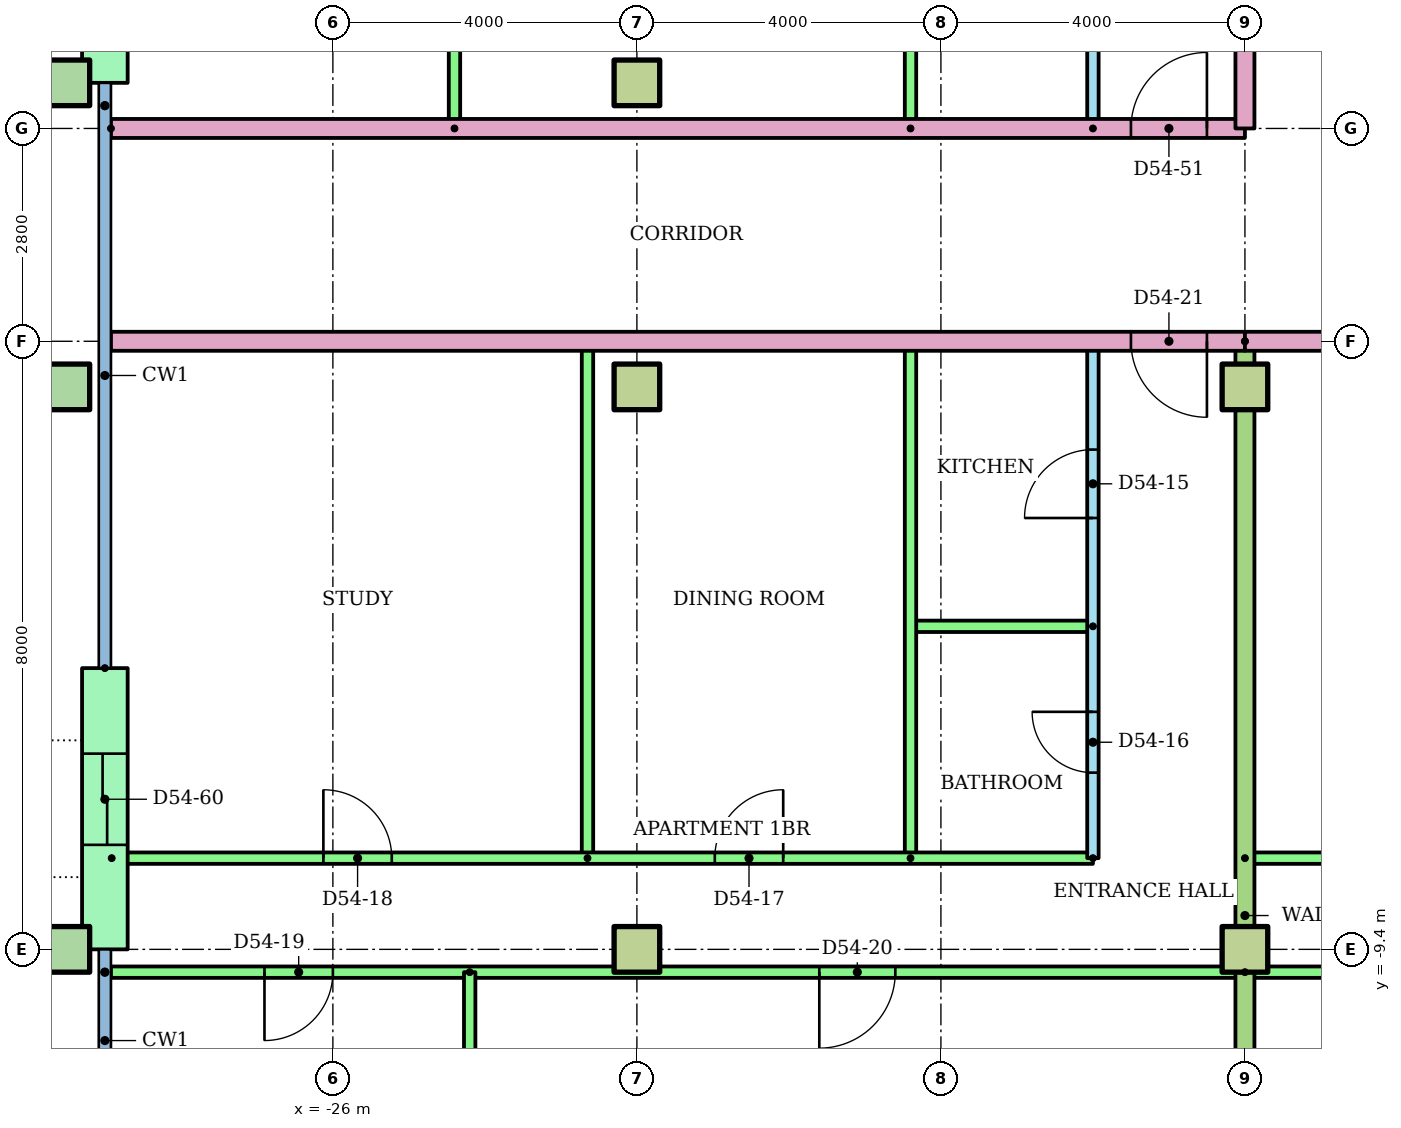
"""IFC4 building model, lengths in metres.
Left out: names, types, materials, properties, quantities, classifications, styles, units other than length and angle.
Written with IfcOpenShell. Run it as: python <this file> out.ifc"""

import sys

from ifc_helpers import new_model, si_unit, direction, frame, frame_2d, origin, origin_2d, place, context, subcontext, project, spatial, rectangle, hollow_rectangle, extrude, element, fill, save


model = new_model("IFC4")
c1 = context("Model", 3, precision=1e-05, world=origin(), true_north=direction((0.0, 1.0)))
c2 = subcontext(c1, "Body", "Model", "MODEL_VIEW")
j1 = project(units=[si_unit("LENGTHUNIT", "METRE"), si_unit("PLANEANGLEUNIT", "RADIAN")], contexts=[c1])
p1 = place(None, origin())
s1 = spatial("IfcSite", under=j1, at=p1, CompositionType="ELEMENT")
p2 = place(p1, origin())
s2 = spatial("IfcBuilding", under=s1, at=p2, CompositionType="ELEMENT")
p3 = place(p2, frame((0.0, 0.0, 210.8)))
s3 = spatial("IfcBuildingStorey", under=s2, at=p3, CompositionType="ELEMENT", Elevation=210.8)
p4 = place(p3, frame((-29.5, -9.4, 0.0)))
e1 = element("IfcColumn", 1, at=p4, inside=s3, PredefinedType="COLUMN", context=c2, shape_type="SweptSolid", body=[
    extrude(hollow_rectangle(XDim=0.6, YDim=0.6, WallThickness=0.03, at=origin_2d()), origin(), (0.0, 0.0, 1.0), 3.2),
])
for number, where in (
    (2, (-22.0, -9.4, 0.0)),
    (3, (-14.0, -9.4, 0.0)),
):
    element("IfcColumn", number, at=place(p3, frame(where)), inside=s3, PredefinedType="COLUMN", context=c2, shape_type="SweptSolid", body=[
        extrude(rectangle(XDim=0.6, YDim=0.6, at=origin_2d()), origin(), (0.0, 0.0, 1.0), 3.2),
    ])
p5 = place(p3, frame((-29.5, -2.0, 0.0)))
e4 = element("IfcColumn", 4, at=p5, inside=s3, PredefinedType="COLUMN", context=c2, shape_type="SweptSolid", body=[
    extrude(hollow_rectangle(XDim=0.6, YDim=0.6, WallThickness=0.03, at=origin_2d()), origin(), (0.0, 0.0, 1.0), 3.2),
])
for number, where in (
    (5, (-22.0, -2.0, 0.0)),
    (6, (-14.0, -2.0, 0.0)),
):
    element("IfcColumn", number, at=place(p3, frame(where)), inside=s3, PredefinedType="COLUMN", context=c2, shape_type="SweptSolid", body=[
        extrude(rectangle(XDim=0.6, YDim=0.6, at=origin_2d()), origin(), (0.0, 0.0, 1.0), 3.2),
    ])
p6 = place(p3, frame((-29.5, 2.0, 0.0)))
e7 = element("IfcColumn", 7, at=p6, inside=s3, PredefinedType="COLUMN", context=c2, shape_type="SweptSolid", body=[
    extrude(hollow_rectangle(XDim=0.6, YDim=0.6, WallThickness=0.03, at=origin_2d()), origin(), (0.0, 0.0, 1.0), 3.2),
])
p7 = place(p3, frame((-22.0, 2.0, 0.0)))
e8 = element("IfcColumn", 8, at=p7, inside=s3, PredefinedType="COLUMN", context=c2, shape_type="SweptSolid", body=[
    extrude(rectangle(XDim=0.6, YDim=0.6, at=origin_2d()), origin(), (0.0, 0.0, 1.0), 3.2),
])
p8 = place(p3, frame((-29.0, 6.5, 0.0), z_axis=(0.0, 0.0, 1.0), x_axis=(0.0, -1.0, 0.0)))
e9 = element("IfcWall", 9, at=p8, inside=s3, PredefinedType="STANDARD", context=c2, shape_type="SweptSolid", body=[
    extrude(rectangle(XDim=4.5, YDim=0.6, at=frame_2d((2.25, 0.0))), origin(), (0.0, 0.0, 1.0), 2.92),
])
p9 = place(p8, frame((1.65, 0.0, 0.0)))
e10 = element("IfcOpeningElement", 10, at=p9, cuts=e9, PredefinedType="OPENING", context=c2, shape_type="SweptSolid", body=[
    extrude(rectangle(XDim=1.2, YDim=2.1, at=frame_2d((0.6, 1.05))), frame((0.0, 0.31, 0.0), z_axis=(0.0, -1.0, 0.0), x_axis=(1.0, 0.0, 0.0)), (0.0, 0.0, 1.0), 0.62),
])
p10 = place(p3, frame((-29.0, -5.7, 0.0), z_axis=(0.0, 0.0, 1.0), x_axis=(0.0, -1.0, 0.0)))
e11 = element("IfcWall", 11, at=p10, inside=s3, PredefinedType="STANDARD", context=c2, shape_type="SweptSolid", body=[
    extrude(rectangle(XDim=3.7, YDim=0.6, at=frame_2d((1.85, 0.0))), origin(), (0.0, 0.0, 1.0), 2.92),
])
p11 = place(p10, frame((1.125, 0.0, 0.0)))
e12 = element("IfcOpeningElement", 12, at=p11, cuts=e11, PredefinedType="OPENING", context=c2, shape_type="SweptSolid", body=[
    extrude(rectangle(XDim=1.2, YDim=2.1, at=frame_2d((0.6, 1.05))), frame((0.0, 0.31, 0.0), z_axis=(0.0, -1.0, 0.0), x_axis=(1.0, 0.0, 0.0)), (0.0, 0.0, 1.0), 0.62),
])
p12 = place(p3, frame((-16.0, -8.2, 0.0), z_axis=(0.0, 0.0, 1.0), x_axis=(0.0, 1.0, 0.0)))
e13 = element("IfcWall", 13, at=p12, inside=s3, PredefinedType="PARTITIONING", context=c2, shape_type="SweptSolid", body=[
    extrude(rectangle(XDim=6.8, YDim=0.15, at=frame_2d((3.4, 0.0))), origin(), (0.0, 0.0, 1.0), 2.4),
])
p13 = place(p12, frame((4.475, 0.0, 0.0)))
e14 = element("IfcOpeningElement", 14, at=p13, cuts=e13, PredefinedType="OPENING", context=c2, shape_type="SweptSolid", body=[
    extrude(rectangle(XDim=0.9, YDim=2.1, at=frame_2d((0.45, 1.05))), frame((0.0, 0.085, 0.0), z_axis=(0.0, -1.0, 0.0), x_axis=(1.0, 0.0, 0.0)), (0.0, 0.0, 1.0), 0.17),
])
p14 = place(p12, frame((1.125, 0.0, 0.0)))
e15 = element("IfcOpeningElement", 15, at=p14, cuts=e13, PredefinedType="OPENING", context=c2, shape_type="SweptSolid", body=[
    extrude(rectangle(XDim=0.8, YDim=2.1, at=frame_2d((0.4, 1.05))), frame((0.0, 0.085, 0.0), z_axis=(0.0, -1.0, 0.0), x_axis=(1.0, 0.0, 0.0)), (0.0, 0.0, 1.0), 0.17),
])
p15 = place(p3, frame((-16.0, -5.15, 0.0), z_axis=(0.0, 0.0, 1.0), x_axis=(-1.0, 0.0, 0.0)))
e16 = element("IfcWall", 16, at=p15, inside=s3, PredefinedType="PARTITIONING", context=c2, shape_type="SweptSolid", body=[
    extrude(rectangle(XDim=2.4, YDim=0.15, at=frame_2d((1.2, 0.0))), origin(), (0.0, 0.0, 1.0), 2.4),
])
for number, where, z_axis, x_axis in (
    (17, (-18.4, -8.2, 0.0), (0.0, 0.0, 1.0), (0.0, 1.0, 0.0)),
    (18, (-22.65, -8.2, 0.0), (0.0, 0.0, 1.0), (0.0, 1.0, 0.0)),
):
    element("IfcWall", number, at=place(p3, frame(where, z_axis=z_axis, x_axis=x_axis)), inside=s3, PredefinedType="PARTITIONING", context=c2, shape_type="SweptSolid", body=[
        extrude(rectangle(XDim=6.8, YDim=0.15, at=frame_2d((3.4, 0.0))), origin(), (0.0, 0.0, 1.0), 2.4),
    ])
p16 = place(p3, frame((-28.91, -8.2, 0.0)))
e19 = element("IfcWall", 19, at=p16, inside=s3, PredefinedType="PARTITIONING", context=c2, shape_type="SweptSolid", body=[
    extrude(rectangle(XDim=12.91, YDim=0.15, at=frame_2d((6.455, 0.0))), origin(), (0.0, 0.0, 1.0), 2.4),
])
p17 = place(p16, frame((7.935, 0.0, 0.0)))
e20 = element("IfcOpeningElement", 20, at=p17, cuts=e19, PredefinedType="OPENING", context=c2, shape_type="SweptSolid", body=[
    extrude(rectangle(XDim=0.9, YDim=2.1, at=frame_2d((0.45, 1.05))), frame((0.0, 0.085, 0.0), z_axis=(0.0, -1.0, 0.0), x_axis=(1.0, 0.0, 0.0)), (0.0, 0.0, 1.0), 0.17),
])
p18 = place(p16, frame((2.785, 0.0, 0.0)))
e21 = element("IfcOpeningElement", 21, at=p18, cuts=e19, PredefinedType="OPENING", context=c2, shape_type="SweptSolid", body=[
    extrude(rectangle(XDim=0.9, YDim=2.1, at=frame_2d((0.45, 1.05))), frame((0.0, 0.085, 0.0), z_axis=(0.0, -1.0, 0.0), x_axis=(1.0, 0.0, 0.0)), (0.0, 0.0, 1.0), 0.17),
])
p19 = place(p3, frame((-14.0, -9.7, 0.0), z_axis=(0.0, 0.0, 1.0), x_axis=(-1.0, 0.0, 0.0)))
e22 = element("IfcWall", 22, at=p19, inside=s3, PredefinedType="PARTITIONING", context=c2, shape_type="SweptSolid", body=[
    extrude(rectangle(XDim=14.92, YDim=0.15, at=frame_2d((7.46, 0.0))), origin(), (0.0, 0.0, 1.0), 2.4),
])
p20 = place(p19, frame((12.0, 0.0, 0.0)))
e23 = element("IfcOpeningElement", 23, at=p20, cuts=e22, PredefinedType="OPENING", context=c2, shape_type="SweptSolid", body=[
    extrude(rectangle(XDim=0.9, YDim=2.1, at=frame_2d((0.45, 1.05))), frame((0.0, 0.085, 0.0), z_axis=(0.0, -1.0, 0.0), x_axis=(1.0, 0.0, 0.0)), (0.0, 0.0, 1.0), 0.17),
])
p21 = place(p19, frame((4.6, 0.0, 0.0)))
e24 = element("IfcOpeningElement", 24, at=p21, cuts=e22, PredefinedType="OPENING", context=c2, shape_type="SweptSolid", body=[
    extrude(rectangle(XDim=1.0, YDim=2.1, at=frame_2d((0.5, 1.05))), frame((0.0, 0.085, 0.0), z_axis=(0.0, -1.0, 0.0), x_axis=(1.0, 0.0, 0.0)), (0.0, 0.0, 1.0), 0.17),
])
p22 = place(p3, frame((-24.2, -9.7, 0.0), z_axis=(0.0, 0.0, 1.0), x_axis=(0.0, -1.0, 0.0)))
e25 = element("IfcWall", 25, at=p22, inside=s3, PredefinedType="PARTITIONING", context=c2, shape_type="SweptSolid", body=[
    extrude(rectangle(XDim=5.02, YDim=0.15, at=frame_2d((2.51, 0.0))), origin(), (0.0, 0.0, 1.0), 2.4),
])
p23 = place(p3, frame((-14.0, -8.2, 0.0)))
e26 = element("IfcWall", 26, at=p23, inside=s3, PredefinedType="PARTITIONING", context=c2, shape_type="SweptSolid", body=[
    extrude(rectangle(XDim=22.0, YDim=0.15, at=frame_2d((11.0, 0.0))), origin(), (0.0, 0.0, 1.0), 2.4),
])
p24 = place(p23, frame((14.624, 0.0, 0.0)))
e27 = element("IfcOpeningElement", 27, at=p24, cuts=e26, PredefinedType="OPENING", context=c2, shape_type="SweptSolid", body=[
    extrude(rectangle(XDim=0.9, YDim=2.1, at=frame_2d((0.45, 1.05))), frame((0.0, 0.085, 0.0), z_axis=(0.0, -1.0, 0.0), x_axis=(1.0, 0.0, 0.0)), (0.0, 0.0, 1.0), 0.17),
])
p25 = place(p23, frame((8.476, 0.0, 0.0)))
e28 = element("IfcOpeningElement", 28, at=p25, cuts=e26, PredefinedType="OPENING", context=c2, shape_type="SweptSolid", body=[
    extrude(rectangle(XDim=0.9, YDim=2.1, at=frame_2d((0.45, 1.05))), frame((0.0, 0.085, 0.0), z_axis=(0.0, -1.0, 0.0), x_axis=(1.0, 0.0, 0.0)), (0.0, 0.0, 1.0), 0.17),
])
p26 = place(p23, frame((1.975, 0.0, 0.0)))
e29 = element("IfcOpeningElement", 29, at=p26, cuts=e26, PredefinedType="OPENING", context=c2, shape_type="SweptSolid", body=[
    extrude(rectangle(XDim=0.9, YDim=2.1, at=frame_2d((0.45, 1.05))), frame((0.0, 0.085, 0.0), z_axis=(0.0, -1.0, 0.0), x_axis=(1.0, 0.0, 0.0)), (0.0, 0.0, 1.0), 0.17),
])
p27 = place(p3, frame((10.0, -9.7, 0.0), z_axis=(0.0, 0.0, 1.0), x_axis=(-1.0, 0.0, 0.0)))
e30 = element("IfcWall", 30, at=p27, inside=s3, PredefinedType="PARTITIONING", context=c2, shape_type="SweptSolid", body=[
    extrude(rectangle(XDim=24.0, YDim=0.15, at=frame_2d((12.0, 0.0))), origin(), (0.0, 0.0, 1.0), 2.4),
])
p28 = place(p27, frame((21.55, 0.0, 0.0)))
e31 = element("IfcOpeningElement", 31, at=p28, cuts=e30, PredefinedType="OPENING", context=c2, shape_type="SweptSolid", body=[
    extrude(rectangle(XDim=0.9, YDim=2.1, at=frame_2d((0.45, 1.05))), frame((0.0, 0.085, 0.0), z_axis=(0.0, -1.0, 0.0), x_axis=(1.0, 0.0, 0.0)), (0.0, 0.0, 1.0), 0.17),
])
p29 = place(p27, frame((17.55, 0.0, 0.0)))
e32 = element("IfcOpeningElement", 32, at=p29, cuts=e30, PredefinedType="OPENING", context=c2, shape_type="SweptSolid", body=[
    extrude(rectangle(XDim=0.9, YDim=2.1, at=frame_2d((0.45, 1.05))), frame((0.0, 0.085, 0.0), z_axis=(0.0, -1.0, 0.0), x_axis=(1.0, 0.0, 0.0)), (0.0, 0.0, 1.0), 0.17),
])
p30 = place(p27, frame((11.5, 0.0, 0.0)))
e33 = element("IfcOpeningElement", 33, at=p30, cuts=e30, PredefinedType="OPENING", context=c2, shape_type="SweptSolid", body=[
    extrude(rectangle(XDim=1.0, YDim=2.1, at=frame_2d((0.5, 1.05))), frame((0.0, 0.085, 0.0), z_axis=(0.0, -1.0, 0.0), x_axis=(1.0, 0.0, 0.0)), (0.0, 0.0, 1.0), 0.17),
])
p31 = place(p27, frame((5.55, 0.0, 0.0)))
e34 = element("IfcOpeningElement", 34, at=p31, cuts=e30, PredefinedType="OPENING", context=c2, shape_type="SweptSolid", body=[
    extrude(rectangle(XDim=0.9, YDim=2.1, at=frame_2d((0.45, 1.05))), frame((0.0, 0.085, 0.0), z_axis=(0.0, -1.0, 0.0), x_axis=(1.0, 0.0, 0.0)), (0.0, 0.0, 1.0), 0.17),
])
p32 = place(p27, frame((1.55, 0.0, 0.0)))
e35 = element("IfcOpeningElement", 35, at=p32, cuts=e30, PredefinedType="OPENING", context=c2, shape_type="SweptSolid", body=[
    extrude(rectangle(XDim=0.9, YDim=2.1, at=frame_2d((0.45, 1.05))), frame((0.0, 0.085, 0.0), z_axis=(0.0, -1.0, 0.0), x_axis=(1.0, 0.0, 0.0)), (0.0, 0.0, 1.0), 0.17),
])
p33 = place(p3, frame((-14.0, -1.4, 0.0), z_axis=(0.0, 0.0, 1.0), x_axis=(0.0, -1.0, 0.0)))
e36 = element("IfcWall", 36, at=p33, inside=s3, PredefinedType="PARTITIONING", context=c2, shape_type="SweptSolid", body=[
    extrude(rectangle(XDim=15.11, YDim=0.25, at=frame_2d((7.555, 0.0))), origin(), (0.0, 0.0, 1.0), 2.4),
])
p34 = place(p3, frame((-14.0, -1.4, 0.0), z_axis=(0.0, 0.0, 1.0), x_axis=(-1.0, 0.0, 0.0)))
e37 = element("IfcWall", 37, at=p34, inside=s3, PredefinedType="PARTITIONING", context=c2, shape_type="SweptSolid", body=[
    extrude(rectangle(XDim=14.92, YDim=0.25, at=frame_2d((7.46, 0.0))), origin(), (0.0, 0.0, 1.0), 2.4),
])
p35 = place(p34, frame((0.5, 0.0, 0.0)))
e38 = element("IfcOpeningElement", 38, at=p35, cuts=e37, PredefinedType="OPENING", context=c2, shape_type="SweptSolid", body=[
    extrude(rectangle(XDim=1.0, YDim=2.1, at=frame_2d((0.5, 1.05))), frame((0.0, 0.135, 0.0), z_axis=(0.0, -1.0, 0.0), x_axis=(1.0, 0.0, 0.0)), (0.0, 0.0, 1.0), 0.27),
])
p36 = place(p3, frame((-16.0, 1.4, 0.0), z_axis=(0.0, 0.0, 1.0), x_axis=(0.0, 1.0, 0.0)))
e39 = element("IfcWall", 39, at=p36, inside=s3, PredefinedType="PARTITIONING", context=c2, shape_type="SweptSolid", body=[
    extrude(rectangle(XDim=9.2, YDim=0.15, at=frame_2d((4.6, 0.0))), origin(), (0.0, 0.0, 1.0), 2.4),
])
p37 = place(p36, frame((2.05, 0.0, 0.0)))
e40 = element("IfcOpeningElement", 40, at=p37, cuts=e39, PredefinedType="OPENING", context=c2, shape_type="SweptSolid", body=[
    extrude(rectangle(XDim=0.9, YDim=2.1, at=frame_2d((0.45, 1.05))), frame((0.0, 0.085, 0.0), z_axis=(0.0, -1.0, 0.0), x_axis=(1.0, 0.0, 0.0)), (0.0, 0.0, 1.0), 0.17),
])
p38 = place(p36, frame((6.7, 0.0, 0.0)))
e41 = element("IfcOpeningElement", 41, at=p38, cuts=e39, PredefinedType="OPENING", context=c2, shape_type="SweptSolid", body=[
    extrude(rectangle(XDim=0.8, YDim=2.1, at=frame_2d((0.4, 1.05))), frame((0.0, 0.085, 0.0), z_axis=(0.0, -1.0, 0.0), x_axis=(1.0, 0.0, 0.0)), (0.0, 0.0, 1.0), 0.17),
])
for number, where, z_axis, x_axis in (
    (42, (-18.4, 1.4, 0.0), (0.0, 0.0, 1.0), (0.0, 1.0, 0.0)),
    (43, (-24.4, 1.4, 0.0), (0.0, 0.0, 1.0), (0.0, 1.0, 0.0)),
):
    element("IfcWall", number, at=place(p3, frame(where, z_axis=z_axis, x_axis=x_axis)), inside=s3, PredefinedType="PARTITIONING", context=c2, shape_type="SweptSolid", body=[
        extrude(rectangle(XDim=9.2, YDim=0.15, at=frame_2d((4.6, 0.0))), origin(), (0.0, 0.0, 1.0), 2.4),
    ])
p39 = place(p3, frame((-28.92, 1.4, 0.0)))
e44 = element("IfcWall", 44, at=p39, inside=s3, PredefinedType="PARTITIONING", context=c2, shape_type="SweptSolid", body=[
    extrude(rectangle(XDim=14.92, YDim=0.25, at=frame_2d((7.46, 0.0))), origin(), (0.0, 0.0, 1.0), 2.4),
])
p40 = place(p39, frame((13.42, 0.0, 0.0)))
e45 = element("IfcOpeningElement", 45, at=p40, cuts=e44, PredefinedType="OPENING", context=c2, shape_type="SweptSolid", body=[
    extrude(rectangle(XDim=1.0, YDim=2.1, at=frame_2d((0.5, 1.05))), frame((0.0, 0.135, 0.0), z_axis=(0.0, -1.0, 0.0), x_axis=(1.0, 0.0, 0.0)), (0.0, 0.0, 1.0), 0.27),
])
p41 = place(p3, frame((14.0, -1.4, 0.0), z_axis=(0.0, 0.0, 1.0), x_axis=(-1.0, 0.0, 0.0)))
e46 = element("IfcWall", 46, at=p41, inside=s3, PredefinedType="PARTITIONING", context=c2, shape_type="SweptSolid", body=[
    extrude(rectangle(XDim=28.0, YDim=0.25, at=frame_2d((14.0, 0.0))), origin(), (0.0, 0.0, 1.0), 2.4),
])
p42 = place(p41, frame((4.5, 0.0, 0.0)))
e47 = element("IfcOpeningElement", 47, at=p42, cuts=e46, PredefinedType="OPENING", context=c2, shape_type="SweptSolid", body=[
    extrude(rectangle(XDim=1.0, YDim=2.1, at=frame_2d((0.5, 1.05))), frame((0.0, 0.135, 0.0), z_axis=(0.0, -1.0, 0.0), x_axis=(1.0, 0.0, 0.0)), (0.0, 0.0, 1.0), 0.27),
])
p43 = place(p41, frame((2.5, 0.0, 0.0)))
e48 = element("IfcOpeningElement", 48, at=p43, cuts=e46, PredefinedType="OPENING", context=c2, shape_type="SweptSolid", body=[
    extrude(rectangle(XDim=1.0, YDim=2.1, at=frame_2d((0.5, 1.05))), frame((0.0, 0.135, 0.0), z_axis=(0.0, -1.0, 0.0), x_axis=(1.0, 0.0, 0.0)), (0.0, 0.0, 1.0), 0.27),
])
p44 = place(p3, frame((-14.0, 3.0, 0.0), z_axis=(0.0, 0.0, 1.0), x_axis=(0.0, -1.0, 0.0)))
e49 = element("IfcWall", 49, at=p44, inside=s3, PredefinedType="PARTITIONING", context=c2, shape_type="SweptSolid", body=[
    extrude(rectangle(XDim=1.6, YDim=0.25, at=frame_2d((0.8, 0.0))), origin(), (0.0, 0.0, 1.0), 2.4),
])
p45 = place(p13, origin())
e50 = element("IfcDoor", 50, at=p45, inside=s3, OperationType="SINGLE_SWING_LEFT", PredefinedType="DOOR", context=c2, shape_type="SweptSolid", body=[
    extrude(rectangle(XDim=0.9, YDim=2.1, at=frame_2d((0.45, 1.05))), frame((0.0, 0.025, 0.0), z_axis=(0.0, -1.0, 0.0), x_axis=(1.0, 0.0, 0.0)), (0.0, 0.0, 1.0), 0.05),
])
fill(e14, e50)
p46 = place(p14, origin())
e51 = element("IfcDoor", 51, at=p46, inside=s3, OperationType="SINGLE_SWING_RIGHT", PredefinedType="DOOR", context=c2, shape_type="SweptSolid", body=[
    extrude(rectangle(XDim=0.8, YDim=2.1, at=frame_2d((0.4, 1.05))), frame((0.0, 0.025, 0.0), z_axis=(0.0, -1.0, 0.0), x_axis=(1.0, 0.0, 0.0)), (0.0, 0.0, 1.0), 0.05),
])
fill(e15, e51)
p47 = place(p17, origin())
e52 = element("IfcDoor", 52, at=p47, inside=s3, OperationType="SINGLE_SWING_RIGHT", PredefinedType="DOOR", context=c2, shape_type="SweptSolid", body=[
    extrude(rectangle(XDim=0.9, YDim=2.1, at=frame_2d((0.45, 1.05))), frame((0.0, 0.025, 0.0), z_axis=(0.0, -1.0, 0.0), x_axis=(1.0, 0.0, 0.0)), (0.0, 0.0, 1.0), 0.05),
])
fill(e20, e52)
p48 = place(p18, origin())
e53 = element("IfcDoor", 53, at=p48, inside=s3, OperationType="SINGLE_SWING_LEFT", PredefinedType="DOOR", context=c2, shape_type="SweptSolid", body=[
    extrude(rectangle(XDim=0.9, YDim=2.1, at=frame_2d((0.45, 1.05))), frame((0.0, 0.025, 0.0), z_axis=(0.0, -1.0, 0.0), x_axis=(1.0, 0.0, 0.0)), (0.0, 0.0, 1.0), 0.05),
])
fill(e21, e53)
p49 = place(p20, origin())
e54 = element("IfcDoor", 54, at=p49, inside=s3, OperationType="SINGLE_SWING_RIGHT", PredefinedType="DOOR", context=c2, shape_type="SweptSolid", body=[
    extrude(rectangle(XDim=0.9, YDim=2.1, at=frame_2d((0.45, 1.05))), frame((0.0, 0.025, 0.0), z_axis=(0.0, -1.0, 0.0), x_axis=(1.0, 0.0, 0.0)), (0.0, 0.0, 1.0), 0.05),
])
fill(e23, e54)
p50 = place(p21, origin())
e55 = element("IfcDoor", 55, at=p50, inside=s3, OperationType="SINGLE_SWING_RIGHT", PredefinedType="DOOR", context=c2, shape_type="SweptSolid", body=[
    extrude(rectangle(XDim=1.0, YDim=2.1, at=frame_2d((0.5, 1.05))), frame((0.0, 0.025, 0.0), z_axis=(0.0, -1.0, 0.0), x_axis=(1.0, 0.0, 0.0)), (0.0, 0.0, 1.0), 0.05),
])
fill(e24, e55)
p51 = place(p35, origin())
e56 = element("IfcDoor", 56, at=p51, inside=s3, OperationType="SINGLE_SWING_LEFT", PredefinedType="DOOR", context=c2, shape_type="SweptSolid", body=[
    extrude(rectangle(XDim=1.0, YDim=2.1, at=frame_2d((0.5, 1.05))), frame((0.0, 0.025, 0.0), z_axis=(0.0, -1.0, 0.0), x_axis=(1.0, 0.0, 0.0)), (0.0, 0.0, 1.0), 0.05),
])
fill(e38, e56)
p52 = place(p40, origin())
e57 = element("IfcDoor", 57, at=p52, inside=s3, OperationType="SINGLE_SWING_RIGHT", PredefinedType="DOOR", context=c2, shape_type="SweptSolid", body=[
    extrude(rectangle(XDim=1.0, YDim=2.1, at=frame_2d((0.5, 1.05))), frame((0.0, 0.025, 0.0), z_axis=(0.0, -1.0, 0.0), x_axis=(1.0, 0.0, 0.0)), (0.0, 0.0, 1.0), 0.05),
])
fill(e45, e57)
p53 = place(p11, origin())
e58 = element("IfcDoor", 58, at=p53, inside=s3, OperationType="SLIDING_TO_LEFT", PredefinedType="DOOR", context=c2, shape_type="SweptSolid", body=[
    extrude(rectangle(XDim=1.2, YDim=2.1, at=frame_2d((0.6, 1.05))), frame((0.0, 0.025, 0.0), z_axis=(0.0, -1.0, 0.0), x_axis=(1.0, 0.0, 0.0)), (0.0, 0.0, 1.0), 0.05),
])
fill(e12, e58)
save(model, sys.argv[1])
